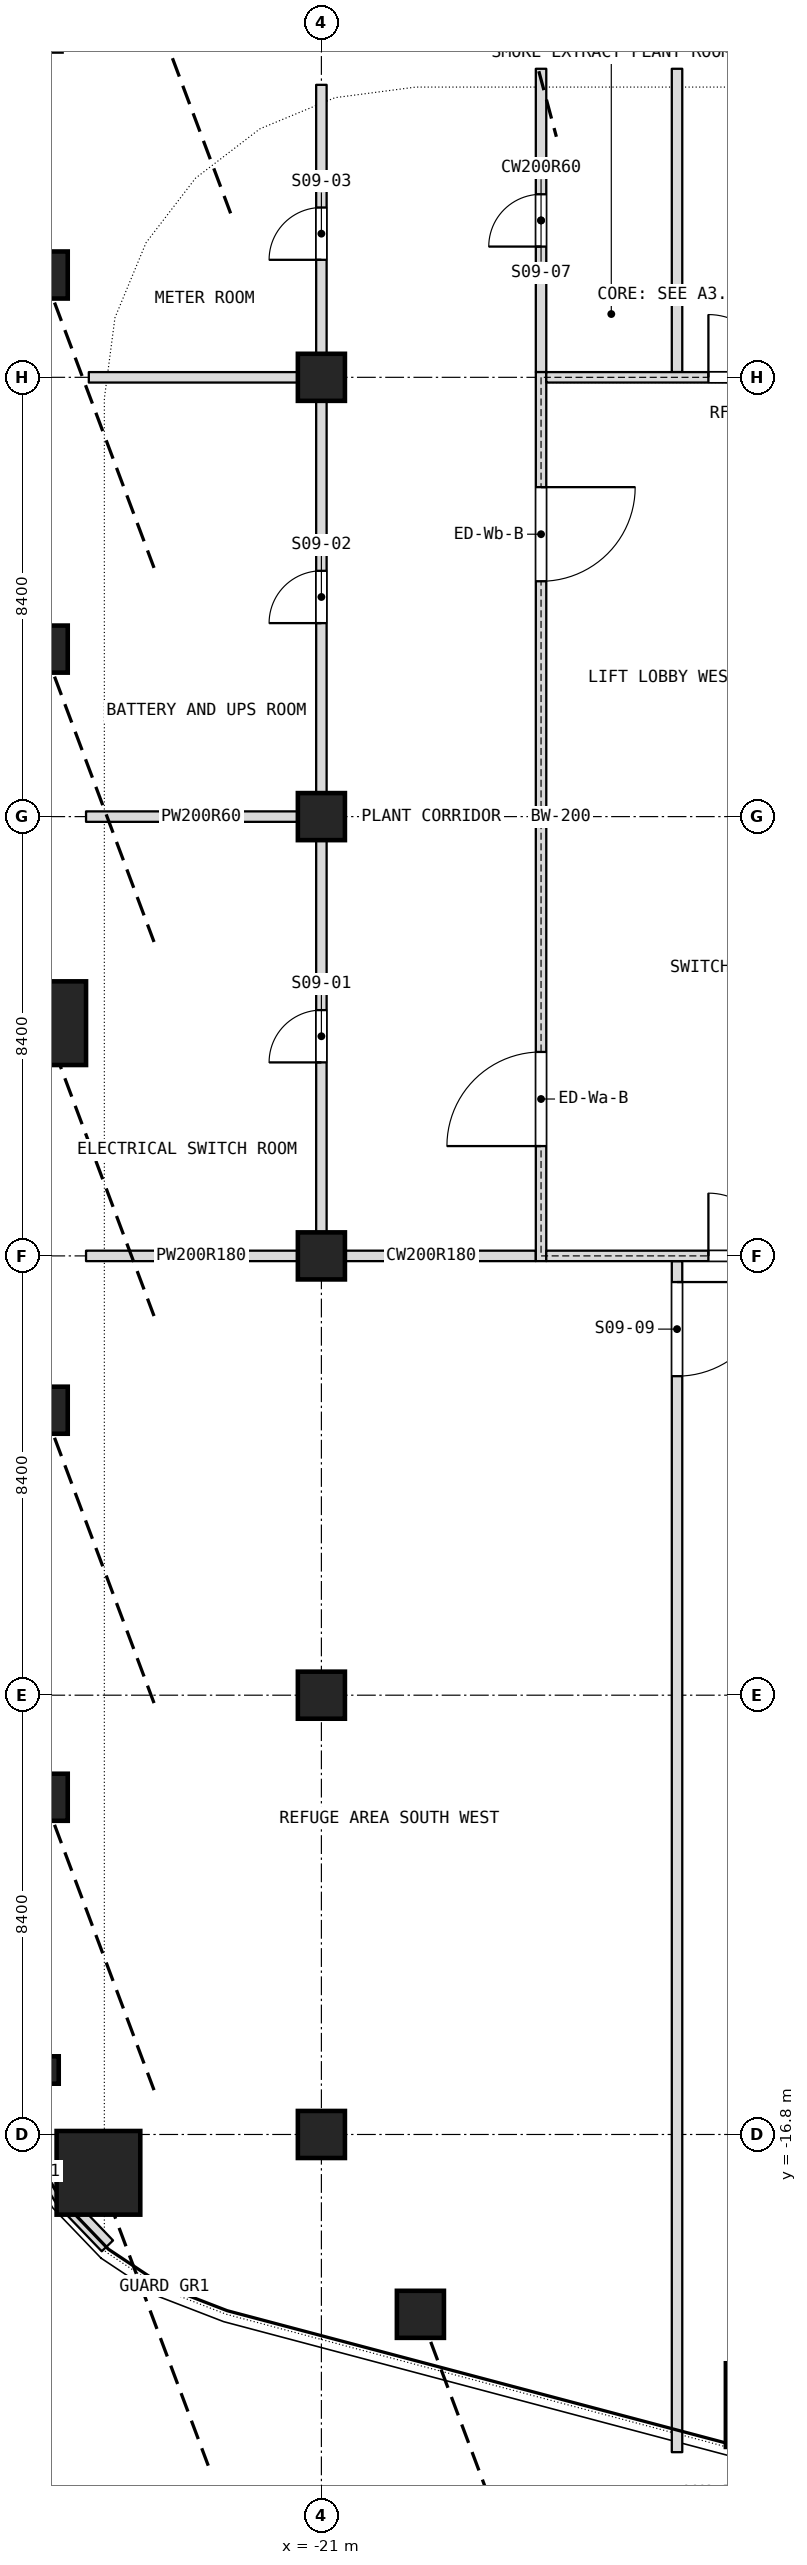
"""IFC4 building model, lengths in metres.
Left out: names, types, materials, properties, quantities, classifications, styles, units other than length and angle.
Written with IfcOpenShell. Run it as: python <this file> out.ifc"""

import sys

from ifc_helpers import new_model, si_unit, direction, frame, frame_2d, origin, origin_2d, place, context, subcontext, project, spatial, rectangle, i_section, extrude, element, fill, save


model = new_model("IFC4")
c1 = context("Model", 3, precision=1e-05, world=origin(), true_north=direction((0.0, 1.0)))
c2 = subcontext(c1, "Body", "Model", "MODEL_VIEW")
j1 = project(units=[si_unit("LENGTHUNIT", "METRE"), si_unit("PLANEANGLEUNIT", "RADIAN")], contexts=[c1])
p1 = place(None, origin())
s1 = spatial("IfcSite", under=j1, at=p1, CompositionType="ELEMENT")
p2 = place(p1, origin())
s2 = spatial("IfcBuilding", under=s1, at=p2, CompositionType="ELEMENT")
p3 = place(p2, frame((0.0, 0.0, 169.7)))
s3 = spatial("IfcBuildingStorey", under=s2, at=p3, CompositionType="ELEMENT", Elevation=169.7)
for number, where, z_axis, x_axis in (
    (1, (-21.0, -16.8, 0.0), (0.0, 0.0, 1.0), (1.0, 0.0, 0.0)),
    (2, (-21.0, -8.4, 0.0), (0.0, 0.0, 1.0), (1.0, 0.0, 0.0)),
    (3, (-21.0, 0.0, 0.0), (0.0, 0.0, 1.0), (1.0, 0.0, 0.0)),
    (4, (-21.0, 8.4, 0.0), (0.0, 0.0, 1.0), (1.0, 0.0, 0.0)),
    (5, (-21.0, 16.8, 0.0), (0.0, 0.0, 1.0), (1.0, 0.0, 0.0)),
):
    element("IfcColumn", number, at=place(p3, frame(where, z_axis=z_axis, x_axis=x_axis)), inside=s3, PredefinedType="COLUMN", context=c2, shape_type="SweptSolid", body=[
        extrude(rectangle(XDim=0.9, YDim=0.9, at=origin_2d()), origin(), (0.0, 0.0, 1.0), 10.8),
    ])
p4 = place(p3, frame((-25.258, -17.529, 0.0), z_axis=(0.0, 0.0, 1.0), x_axis=(1.0, 0.0, 0.0)))
e6 = element("IfcColumn", 6, at=p4, inside=s3, PredefinedType="COLUMN", context=c2, shape_type="SweptSolid", body=[
    extrude(i_section(OverallWidth=0.306, OverallDepth=0.524, WebThickness=0.024, FlangeThickness=0.04, FilletRadius=0.027, at=origin_2d()), origin(), (0.0, 0.0, 1.0), 10.14),
])
p5 = place(p3, frame((-26.175, -15.567, -0.3), z_axis=(0.0, 0.0, 1.0), x_axis=(1.0, 0.0, 0.0)))
e7 = element("IfcColumn", 7, at=p5, inside=s3, PredefinedType="COLUMN", context=c2, shape_type="SweptSolid", body=[
    extrude(i_section(OverallWidth=0.306, OverallDepth=0.524, WebThickness=0.024, FlangeThickness=0.04, FilletRadius=0.027, at=origin_2d()), origin(), (0.0, 0.0, 1.0), 10.44),
])
for number, where, z_axis, x_axis in (
    (8, (-26.3, -10.352, 0.0), (0.0, 0.0, 1.0), (1.0, 0.0, 0.0)),
    (9, (-26.3, -2.951, 0.0), (0.0, 0.0, 1.0), (1.0, 0.0, 0.0)),
    (10, (-26.3, 4.45, 0.0), (0.0, 0.0, 1.0), (1.0, 0.0, 0.0)),
    (11, (-26.3, 11.603, 0.0), (0.0, 0.0, 1.0), (1.0, 0.0, 0.0)),
    (12, (-26.3, 18.756, 0.0), (0.0, 0.0, 1.0), (1.0, 0.0, 0.0)),
):
    element("IfcColumn", number, at=place(p3, frame(where, z_axis=z_axis, x_axis=x_axis)), inside=s3, PredefinedType="COLUMN", context=c2, shape_type="SweptSolid", body=[
        extrude(i_section(OverallWidth=0.306, OverallDepth=0.524, WebThickness=0.024, FlangeThickness=0.04, FilletRadius=0.027, at=origin_2d()), origin(), (0.0, 0.0, 1.0), 10.14),
    ])
p6 = place(p3, frame((-25.5, 0.0, 0.0), z_axis=(0.0, 0.0, 1.0), x_axis=(1.0, 0.0, 0.0)))
e13 = element("IfcWall", 13, at=p6, inside=s3, PredefinedType="PARTITIONING", context=c2, shape_type="SweptSolid", body=[
    extrude(rectangle(XDim=4.4, YDim=0.2, at=frame_2d((2.2, 0.0))), origin(), (0.0, 0.0, 1.0), 10.14),
])
p7 = place(p3, frame((-20.9, 0.0, 0.0), z_axis=(0.0, 0.0, 1.0), x_axis=(1.0, 0.0, 0.0)))
e14 = element("IfcWall", 14, at=p7, inside=s3, PredefinedType="PARTITIONING", context=c2, shape_type="SweptSolid", body=[
    extrude(rectangle(XDim=4.0, YDim=0.2, at=frame_2d((2.0, 0.0))), origin(), (0.0, 0.0, 1.0), 10.14),
])
p8 = place(p3, frame((-25.5, 8.4, 0.0), z_axis=(0.0, 0.0, 1.0), x_axis=(1.0, 0.0, 0.0)))
e15 = element("IfcWall", 15, at=p8, inside=s3, PredefinedType="PARTITIONING", context=c2, shape_type="SweptSolid", body=[
    extrude(rectangle(XDim=4.4, YDim=0.2, at=frame_2d((2.2, 0.0))), origin(), (0.0, 0.0, 1.0), 10.14),
])
p9 = place(p3, frame((-14.2, -22.875, 0.0), z_axis=(0.0, 0.0, 1.0), x_axis=(0.0, 1.0, 0.0)))
e16 = element("IfcWall", 16, at=p9, inside=s3, PredefinedType="PARTITIONING", context=c2, shape_type="SweptSolid", body=[
    extrude(rectangle(XDim=22.775, YDim=0.2, at=frame_2d((11.387, 0.0))), origin(), (0.0, 0.0, 1.0), 10.54),
])
p10 = place(p9, frame((20.575, 0.0, 0.0)))
e17 = element("IfcOpeningElement", 17, at=p10, cuts=e16, PredefinedType="OPENING", context=c2, shape_type="SweptSolid", body=[
    extrude(rectangle(XDim=1.8, YDim=2.1, at=frame_2d((0.9, 1.05))), frame((0.0, 0.1, 0.0), z_axis=(0.0, -1.0, 0.0), x_axis=(1.0, 0.0, 0.0)), (0.0, 0.0, 1.0), 0.2),
])
p11 = place(p3, frame((-14.2, 16.9, 0.0), z_axis=(0.0, 0.0, 1.0), x_axis=(0.0, 1.0, 0.0)))
e18 = element("IfcWall", 18, at=p11, inside=s3, PredefinedType="PARTITIONING", context=c2, shape_type="SweptSolid", body=[
    extrude(rectangle(XDim=5.8, YDim=0.2, at=frame_2d((2.9, 0.0))), origin(), (0.0, 0.0, 1.0), 10.54),
])
p12 = place(p3, frame((-16.8, 16.9, 0.0), z_axis=(0.0, 0.0, 1.0), x_axis=(0.0, 1.0, 0.0)))
e19 = element("IfcWall", 19, at=p12, inside=s3, PredefinedType="PARTITIONING", context=c2, shape_type="SweptSolid", body=[
    extrude(rectangle(XDim=5.8, YDim=0.2, at=frame_2d((2.9, 0.0))), origin(), (0.0, 0.0, 1.0), 10.14),
])
p13 = place(p12, frame((2.4, 0.0, 0.0)))
e20 = element("IfcOpeningElement", 20, at=p13, cuts=e19, PredefinedType="OPENING", context=c2, shape_type="SweptSolid", body=[
    extrude(rectangle(XDim=1.0, YDim=2.1, at=frame_2d((0.5, 1.05))), frame((0.0, 0.1, 0.0), z_axis=(0.0, -1.0, 0.0), x_axis=(1.0, 0.0, 0.0)), (0.0, 0.0, 1.0), 0.2),
])
p14 = place(p3, frame((-25.447, 16.8, 0.0), z_axis=(0.0, 0.0, 1.0), x_axis=(1.0, 0.0, 0.0)))
e21 = element("IfcWall", 21, at=p14, inside=s3, PredefinedType="PARTITIONING", context=c2, shape_type="SweptSolid", body=[
    extrude(rectangle(XDim=4.347, YDim=0.2, at=frame_2d((2.173, 0.0))), origin(), (0.0, 0.0, 1.0), 10.14),
])
p15 = place(p3, frame((-21.0, -0.1, 0.0), z_axis=(0.0, 0.0, 1.0), x_axis=(0.0, 1.0, 0.0)))
e22 = element("IfcWall", 22, at=p15, inside=s3, PredefinedType="PARTITIONING", context=c2, shape_type="SweptSolid", body=[
    extrude(rectangle(XDim=22.493, YDim=0.2, at=frame_2d((11.247, 0.0))), origin(), (0.0, 0.0, 1.0), 10.14),
])
p16 = place(p15, frame((3.8, 0.0, 0.0)))
e23 = element("IfcOpeningElement", 23, at=p16, cuts=e22, PredefinedType="OPENING", context=c2, shape_type="SweptSolid", body=[
    extrude(rectangle(XDim=1.0, YDim=2.1, at=frame_2d((0.5, 1.05))), frame((0.0, 0.1, 0.0), z_axis=(0.0, -1.0, 0.0), x_axis=(1.0, 0.0, 0.0)), (0.0, 0.0, 1.0), 0.2),
])
p17 = place(p15, frame((12.2, 0.0, 0.0)))
e24 = element("IfcOpeningElement", 24, at=p17, cuts=e22, PredefinedType="OPENING", context=c2, shape_type="SweptSolid", body=[
    extrude(rectangle(XDim=1.0, YDim=2.1, at=frame_2d((0.5, 1.05))), frame((0.0, 0.1, 0.0), z_axis=(0.0, -1.0, 0.0), x_axis=(1.0, 0.0, 0.0)), (0.0, 0.0, 1.0), 0.2),
])
p18 = place(p15, frame((19.147, 0.0, 0.0)))
e25 = element("IfcOpeningElement", 25, at=p18, cuts=e22, PredefinedType="OPENING", context=c2, shape_type="SweptSolid", body=[
    extrude(rectangle(XDim=1.0, YDim=2.1, at=frame_2d((0.5, 1.05))), frame((0.0, 0.1, 0.0), z_axis=(0.0, -1.0, 0.0), x_axis=(1.0, 0.0, 0.0)), (0.0, 0.0, 1.0), 0.2),
])
p19 = place(p3, frame((-25.927, -18.065, 10.8), z_axis=(0.0, 0.0, 1.0), x_axis=(-0.519698377403, 0.854349809226, 0.0)))
e26 = element("IfcWall", 26, at=p19, inside=s3, PredefinedType="PARAPET", context=c2, shape_type="SweptSolid", body=[
    extrude(rectangle(XDim=1.309, YDim=0.3, at=frame_2d((0.654, 0.0))), origin(), (0.0, 0.0, 1.0), 1.1),
])
p20 = place(p3, frame((-25.092, -18.93, 10.8), z_axis=(0.0, 0.0, 1.0), x_axis=(-0.692535941108, 0.721383372607, 0.0)))
e27 = element("IfcWall", 27, at=p20, inside=s3, PredefinedType="PARAPET", context=c2, shape_type="SweptSolid", body=[
    extrude(rectangle(XDim=1.236, YDim=0.3, at=frame_2d((0.618, 0.0))), origin(), (0.0, 0.0, 1.0), 1.1),
])
p21 = place(p3, frame((-16.8, -0.1, 0.0), z_axis=(0.0, 0.0, 1.0), x_axis=(0.0, 1.0, 0.0)))
e28 = element("IfcWall", 28, at=p21, inside=s3, PredefinedType="PARTITIONING", context=c2, shape_type="SweptSolid", body=[
    extrude(rectangle(XDim=17.0, YDim=0.2, at=frame_2d((8.5, 0.0))), origin(), (0.0, 0.0, 1.0), 10.54),
])
p22 = place(p21, frame((2.2, 0.0, 0.0)))
e29 = element("IfcOpeningElement", 29, at=p22, cuts=e28, PredefinedType="OPENING", context=c2, shape_type="SweptSolid", body=[
    extrude(rectangle(XDim=1.8, YDim=2.1, at=frame_2d((0.9, 1.05))), frame((0.0, 0.1, 0.0), z_axis=(0.0, -1.0, 0.0), x_axis=(1.0, 0.0, 0.0)), (0.0, 0.0, 1.0), 0.2),
])
p23 = place(p21, frame((13.0, 0.0, 0.0)))
e30 = element("IfcOpeningElement", 30, at=p23, cuts=e28, PredefinedType="OPENING", context=c2, shape_type="SweptSolid", body=[
    extrude(rectangle(XDim=1.8, YDim=2.1, at=frame_2d((0.9, 1.05))), frame((0.0, 0.1, 0.0), z_axis=(0.0, -1.0, 0.0), x_axis=(1.0, 0.0, 0.0)), (0.0, 0.0, 1.0), 0.2),
])
p24 = place(p3, frame((-16.7, 0.0, 0.0), z_axis=(0.0, 0.0, 1.0), x_axis=(1.0, 0.0, 0.0)))
e31 = element("IfcWall", 31, at=p24, inside=s3, PredefinedType="PARTITIONING", context=c2, shape_type="SweptSolid", body=[
    extrude(rectangle(XDim=4.6, YDim=0.2, at=frame_2d((2.3, 0.0))), origin(), (0.0, 0.0, 1.0), 10.14),
])
p25 = place(p24, frame((3.1, 0.0, 0.0)))
e32 = element("IfcOpeningElement", 32, at=p25, cuts=e31, PredefinedType="OPENING", context=c2, shape_type="SweptSolid", body=[
    extrude(rectangle(XDim=1.2, YDim=2.1, at=frame_2d((0.6, 1.05))), frame((0.0, 0.1, 0.0), z_axis=(0.0, -1.0, 0.0), x_axis=(1.0, 0.0, 0.0)), (0.0, 0.0, 1.0), 0.2),
])
p26 = place(p3, frame((-16.7, 16.8, 0.0), z_axis=(0.0, 0.0, 1.0), x_axis=(1.0, 0.0, 0.0)))
e33 = element("IfcWall", 33, at=p26, inside=s3, PredefinedType="PARTITIONING", context=c2, shape_type="SweptSolid", body=[
    extrude(rectangle(XDim=4.6, YDim=0.2, at=frame_2d((2.3, 0.0))), origin(), (0.0, 0.0, 1.0), 10.14),
])
p27 = place(p26, frame((3.1, 0.0, 0.0)))
e34 = element("IfcOpeningElement", 34, at=p27, cuts=e33, PredefinedType="OPENING", context=c2, shape_type="SweptSolid", body=[
    extrude(rectangle(XDim=1.2, YDim=2.1, at=frame_2d((0.6, 1.05))), frame((0.0, 0.1, 0.0), z_axis=(0.0, -1.0, 0.0), x_axis=(1.0, 0.0, 0.0)), (0.0, 0.0, 1.0), 0.2),
])
p28 = place(p16, origin())
e35 = element("IfcDoor", 35, at=p28, inside=s3, OperationType="SINGLE_SWING_LEFT", PredefinedType="DOOR", context=c2, shape_type="SweptSolid", body=[
    extrude(rectangle(XDim=1.0, YDim=2.1, at=frame_2d((0.5, 1.05))), frame((0.0, 0.025, 0.0), z_axis=(0.0, -1.0, 0.0), x_axis=(1.0, 0.0, 0.0)), (0.0, 0.0, 1.0), 0.05),
])
fill(e23, e35)
p29 = place(p17, origin())
e36 = element("IfcDoor", 36, at=p29, inside=s3, OperationType="SINGLE_SWING_RIGHT", PredefinedType="DOOR", context=c2, shape_type="SweptSolid", body=[
    extrude(rectangle(XDim=1.0, YDim=2.1, at=frame_2d((0.5, 1.05))), frame((0.0, 0.025, 0.0), z_axis=(0.0, -1.0, 0.0), x_axis=(1.0, 0.0, 0.0)), (0.0, 0.0, 1.0), 0.05),
])
fill(e24, e36)
p30 = place(p18, origin())
e37 = element("IfcDoor", 37, at=p30, inside=s3, OperationType="SINGLE_SWING_RIGHT", PredefinedType="DOOR", context=c2, shape_type="SweptSolid", body=[
    extrude(rectangle(XDim=1.0, YDim=2.1, at=frame_2d((0.5, 1.05))), frame((0.0, 0.025, 0.0), z_axis=(0.0, -1.0, 0.0), x_axis=(1.0, 0.0, 0.0)), (0.0, 0.0, 1.0), 0.05),
])
fill(e25, e37)
p31 = place(p13, origin())
e38 = element("IfcDoor", 38, at=p31, inside=s3, OperationType="SINGLE_SWING_RIGHT", PredefinedType="DOOR", context=c2, shape_type="SweptSolid", body=[
    extrude(rectangle(XDim=1.0, YDim=2.1, at=frame_2d((0.5, 1.05))), frame((0.0, 0.025, 0.0), z_axis=(0.0, -1.0, 0.0), x_axis=(1.0, 0.0, 0.0)), (0.0, 0.0, 1.0), 0.05),
])
fill(e20, e38)
p32 = place(p10, origin())
e39 = element("IfcDoor", 39, at=p32, inside=s3, OperationType="DOUBLE_DOOR_SINGLE_SWING", PredefinedType="DOOR", context=c2, shape_type="SweptSolid", body=[
    extrude(rectangle(XDim=1.8, YDim=2.1, at=frame_2d((0.9, 1.05))), frame((0.0, 0.025, 0.0), z_axis=(0.0, -1.0, 0.0), x_axis=(1.0, 0.0, 0.0)), (0.0, 0.0, 1.0), 0.05),
])
fill(e17, e39)
p33 = place(p22, origin())
e40 = element("IfcDoor", 40, at=p33, inside=s3, OperationType="DOUBLE_DOOR_SINGLE_SWING", PredefinedType="DOOR", context=c2, shape_type="SweptSolid", body=[
    extrude(rectangle(XDim=1.8, YDim=2.1, at=frame_2d((0.9, 1.05))), frame((0.0, 0.025, 0.0), z_axis=(0.0, -1.0, 0.0), x_axis=(1.0, 0.0, 0.0)), (0.0, 0.0, 1.0), 0.05),
])
fill(e29, e40)
p34 = place(p23, origin())
e41 = element("IfcDoor", 41, at=p34, inside=s3, OperationType="DOUBLE_DOOR_SINGLE_SWING", PredefinedType="DOOR", context=c2, shape_type="SweptSolid", body=[
    extrude(rectangle(XDim=1.8, YDim=2.1, at=frame_2d((0.9, 1.05))), frame((0.0, 0.025, 0.0), z_axis=(0.0, -1.0, 0.0), x_axis=(1.0, 0.0, 0.0)), (0.0, 0.0, 1.0), 0.05),
])
fill(e30, e41)
p35 = place(p25, origin())
e42 = element("IfcDoor", 42, at=p35, inside=s3, OperationType="SINGLE_SWING_LEFT", PredefinedType="DOOR", context=c2, shape_type="SweptSolid", body=[
    extrude(rectangle(XDim=1.2, YDim=2.1, at=frame_2d((0.6, 1.05))), frame((0.0, 0.025, 0.0), z_axis=(0.0, -1.0, 0.0), x_axis=(1.0, 0.0, 0.0)), (0.0, 0.0, 1.0), 0.05),
])
fill(e32, e42)
p36 = place(p27, origin())
e43 = element("IfcDoor", 43, at=p36, inside=s3, OperationType="SINGLE_SWING_LEFT", PredefinedType="DOOR", context=c2, shape_type="SweptSolid", body=[
    extrude(rectangle(XDim=1.2, YDim=2.1, at=frame_2d((0.6, 1.05))), frame((0.0, 0.025, 0.0), z_axis=(0.0, -1.0, 0.0), x_axis=(1.0, 0.0, 0.0)), (0.0, 0.0, 1.0), 0.05),
])
fill(e34, e43)
save(model, sys.argv[1])
